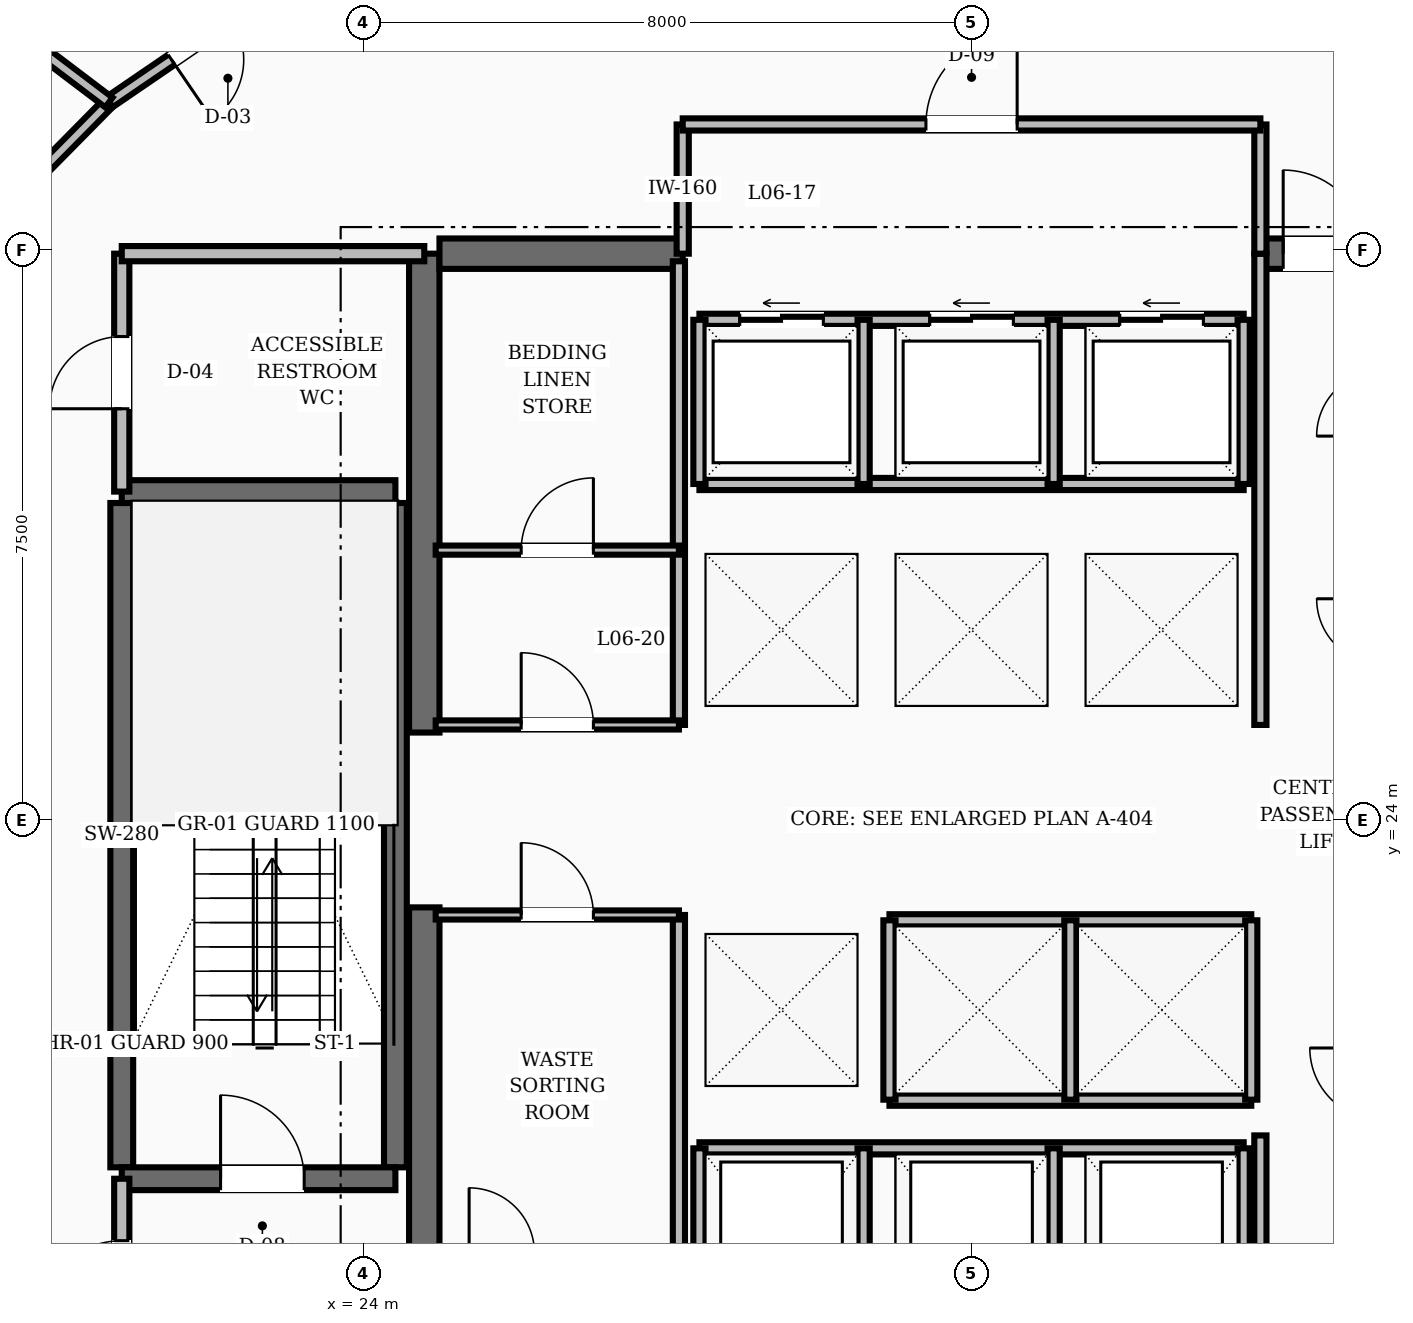
"""IFC4 building model, lengths in metres.
Left out: names, types, materials, properties, quantities, classifications, styles, units other than length and angle.
Written with IfcOpenShell. Run it as: python <this file> out.ifc"""

import sys

from ifc_helpers import new_model, si_unit, direction, frame, frame_2d, origin, place, context, subcontext, project, spatial, rectangle, extrude, element, fill, save


model = new_model("IFC4")
c1 = context("Model", 3, precision=1e-05, world=origin(), true_north=direction((0.0, 1.0)))
c2 = subcontext(c1, "Body", "Model", "MODEL_VIEW")
j1 = project(units=[si_unit("LENGTHUNIT", "METRE"), si_unit("PLANEANGLEUNIT", "RADIAN")], contexts=[c1])
p1 = place(None, origin())
s1 = spatial("IfcSite", under=j1, at=p1, CompositionType="ELEMENT")
p2 = place(p1, origin())
s2 = spatial("IfcBuilding", under=s1, at=p2, CompositionType="ELEMENT")
p3 = place(p2, frame((0.0, 0.0, 30.4)))
s3 = spatial("IfcBuildingStorey", under=s2, at=p3, CompositionType="ELEMENT", Elevation=30.4)
for number, where, z_axis, x_axis in (
    (1, (24.8, 16.55, 0.0), (0.0, 0.0, 1.0), (0.0, 1.0, 0.0)),
    (2, (24.8, 25.15, 0.0), (0.0, 0.0, 1.0), (0.0, 1.0, 0.0)),
):
    element("IfcWall", number, at=place(p3, frame(where, z_axis=z_axis, x_axis=x_axis)), inside=s3, PredefinedType="SHEAR", context=c2, shape_type="SweptSolid", body=[
        extrude(rectangle(XDim=6.3, YDim=0.4, at=frame_2d((3.15, 0.0))), origin(), (0.0, 0.0, 1.0), 3.6),
    ])
p4 = place(p3, frame((25.0, 31.45, 0.0), z_axis=(0.0, 0.0, 1.0), x_axis=(1.0, 0.0, 0.0)))
e3 = element("IfcWall", 3, at=p4, inside=s3, PredefinedType="SHEAR", context=c2, shape_type="SweptSolid", body=[
    extrude(rectangle(XDim=3.2, YDim=0.4, at=frame_2d((1.6, 0.0))), origin(), (0.0, 0.0, 1.0), 3.6),
])
p5 = place(p3, frame((35.8, 31.45, 0.0), z_axis=(0.0, 0.0, 1.0), x_axis=(1.0, 0.0, 0.0)))
e4 = element("IfcWall", 4, at=p5, inside=s3, PredefinedType="SHEAR", context=c2, shape_type="SweptSolid", body=[
    extrude(rectangle(XDim=3.2, YDim=0.4, at=frame_2d((1.6, 0.0))), origin(), (0.0, 0.0, 1.0), 3.6),
])
p6 = place(p5, frame((0.3, 0.0, 0.0)))
e5 = element("IfcOpeningElement", 5, at=p6, cuts=e4, PredefinedType="OPENING", context=c2, shape_type="SweptSolid", body=[
    extrude(rectangle(XDim=1.1, YDim=2.1, at=frame_2d((0.55, 1.05))), frame((0.0, 0.21, 0.0), z_axis=(0.0, -1.0, 0.0), x_axis=(1.0, 0.0, 0.0)), (0.0, 0.0, 1.0), 0.42),
])
for number, where, z_axis, x_axis in (
    (6, (20.82, 19.43, 0.0), (0.0, 0.0, 1.0), (0.0, 1.0, 0.0)),
    (7, (24.42, 19.43, 0.0), (0.0, 0.0, 1.0), (0.0, 1.0, 0.0)),
):
    element("IfcWall", number, at=place(p3, frame(where, z_axis=z_axis, x_axis=x_axis)), inside=s3, PredefinedType="SHEAR", context=c2, shape_type="SweptSolid", body=[
        extrude(rectangle(XDim=8.74, YDim=0.3, at=frame_2d((4.37, 0.0))), origin(), (0.0, 0.0, 1.0), 3.6),
    ])
p7 = place(p3, frame((20.82, 19.28, 0.0), z_axis=(0.0, 0.0, 1.0), x_axis=(1.0, 0.0, 0.0)))
e8 = element("IfcWall", 8, at=p7, inside=s3, PredefinedType="SHEAR", context=c2, shape_type="SweptSolid", body=[
    extrude(rectangle(XDim=3.6, YDim=0.3, at=frame_2d((1.8, 0.0))), origin(), (0.0, 0.0, 1.0), 3.6),
])
p8 = place(p7, frame((1.3, 0.0, 0.0)))
e9 = element("IfcOpeningElement", 9, at=p8, cuts=e8, PredefinedType="OPENING", context=c2, shape_type="SweptSolid", body=[
    extrude(rectangle(XDim=1.1, YDim=2.1, at=frame_2d((0.55, 1.05))), frame((0.0, 0.16, 0.0), z_axis=(0.0, -1.0, 0.0), x_axis=(1.0, 0.0, 0.0)), (0.0, 0.0, 1.0), 0.32),
])
p9 = place(p3, frame((20.82, 28.32, 0.0), z_axis=(0.0, 0.0, 1.0), x_axis=(1.0, 0.0, 0.0)))
e10 = element("IfcWall", 10, at=p9, inside=s3, PredefinedType="SHEAR", context=c2, shape_type="SweptSolid", body=[
    extrude(rectangle(XDim=3.6, YDim=0.3, at=frame_2d((1.8, 0.0))), origin(), (0.0, 0.0, 1.0), 3.6),
])
p10 = place(p3, frame((20.82, 16.55, 0.0), z_axis=(0.0, 0.0, 1.0), x_axis=(0.0, 1.0, 0.0)))
e11 = element("IfcWall", 11, at=p10, inside=s3, PredefinedType="SOLIDWALL", context=c2, shape_type="SweptSolid", body=[
    extrude(rectangle(XDim=2.73, YDim=0.2, at=frame_2d((1.365, 0.0))), origin(), (0.0, 0.0, 1.0), 2.61),
])
p11 = place(p10, frame((0.815, 0.0, 0.0)))
e12 = element("IfcOpeningElement", 12, at=p11, cuts=e11, PredefinedType="OPENING", context=c2, shape_type="SweptSolid", body=[
    extrude(rectangle(XDim=1.1, YDim=2.1, at=frame_2d((0.55, 1.05))), frame((0.0, 0.11, 0.0), z_axis=(0.0, -1.0, 0.0), x_axis=(1.0, 0.0, 0.0)), (0.0, 0.0, 1.0), 0.22),
])
p12 = place(p3, frame((20.82, 28.32, 0.0), z_axis=(0.0, 0.0, 1.0), x_axis=(0.0, 1.0, 0.0)))
e13 = element("IfcWall", 13, at=p12, inside=s3, PredefinedType="SOLIDWALL", context=c2, shape_type="SweptSolid", body=[
    extrude(rectangle(XDim=3.13, YDim=0.2, at=frame_2d((1.565, 0.0))), origin(), (0.0, 0.0, 1.0), 2.61),
])
p13 = place(p12, frame((1.09, 0.0, 0.0)))
e14 = element("IfcOpeningElement", 14, at=p13, cuts=e13, PredefinedType="OPENING", context=c2, shape_type="SweptSolid", body=[
    extrude(rectangle(XDim=0.95, YDim=2.1, at=frame_2d((0.475, 1.05))), frame((0.0, 0.11, 0.0), z_axis=(0.0, -1.0, 0.0), x_axis=(1.0, 0.0, 0.0)), (0.0, 0.0, 1.0), 0.22),
])
p14 = place(p3, frame((20.82, 31.45, 0.0), z_axis=(0.0, 0.0, 1.0), x_axis=(1.0, 0.0, 0.0)))
e15 = element("IfcWall", 15, at=p14, inside=s3, PredefinedType="SOLIDWALL", context=c2, shape_type="SweptSolid", body=[
    extrude(rectangle(XDim=3.98, YDim=0.2, at=frame_2d((1.99, 0.0))), origin(), (0.0, 0.0, 1.0), 2.61),
])
p15 = place(p3, frame((35.8, 16.55, 0.0), z_axis=(0.0, 0.0, 1.0), x_axis=(0.0, 1.0, 0.0)))
e16 = element("IfcWall", 16, at=p15, inside=s3, PredefinedType="SOLIDWALL", context=c2, shape_type="SweptSolid", body=[
    extrude(rectangle(XDim=3.3, YDim=0.16, at=frame_2d((1.65, 0.0))), origin(), (0.0, 0.0, 1.0), 2.61),
])
p16 = place(p3, frame((35.8, 25.25, 0.0), z_axis=(0.0, 0.0, 1.0), x_axis=(0.0, 1.0, 0.0)))
e17 = element("IfcWall", 17, at=p16, inside=s3, PredefinedType="SOLIDWALL", context=c2, shape_type="SweptSolid", body=[
    extrude(rectangle(XDim=6.2, YDim=0.16, at=frame_2d((3.1, 0.0))), origin(), (0.0, 0.0, 1.0), 2.61),
])
p17 = place(p3, frame((28.42, 30.58, 0.0), z_axis=(0.0, 0.0, 1.0), x_axis=(1.0, 0.0, 0.0)))
e18 = element("IfcWall", 18, at=p17, inside=s3, PredefinedType="SOLIDWALL", context=c2, shape_type="SweptSolid", body=[
    extrude(rectangle(XDim=7.16, YDim=0.16, at=frame_2d((3.58, 0.0))), origin(), (0.0, 0.0, 1.0), 2.61),
])
p18 = place(p17, frame((0.53, 0.0, 0.0)))
e19 = element("IfcOpeningElement", 19, at=p18, cuts=e18, PredefinedType="OPENING", context=c2, shape_type="SweptSolid", body=[
    extrude(rectangle(XDim=1.1, YDim=2.15, at=frame_2d((0.55, 1.075))), frame((0.0, 0.09, 0.0), z_axis=(0.0, -1.0, 0.0), x_axis=(1.0, 0.0, 0.0)), (0.0, 0.0, 1.0), 0.18),
])
p19 = place(p17, frame((3.03, 0.0, 0.0)))
e20 = element("IfcOpeningElement", 20, at=p19, cuts=e18, PredefinedType="OPENING", context=c2, shape_type="SweptSolid", body=[
    extrude(rectangle(XDim=1.1, YDim=2.15, at=frame_2d((0.55, 1.075))), frame((0.0, 0.09, 0.0), z_axis=(0.0, -1.0, 0.0), x_axis=(1.0, 0.0, 0.0)), (0.0, 0.0, 1.0), 0.18),
])
p20 = place(p17, frame((5.53, 0.0, 0.0)))
e21 = element("IfcOpeningElement", 21, at=p20, cuts=e18, PredefinedType="OPENING", context=c2, shape_type="SweptSolid", body=[
    extrude(rectangle(XDim=1.1, YDim=2.15, at=frame_2d((0.55, 1.075))), frame((0.0, 0.09, 0.0), z_axis=(0.0, -1.0, 0.0), x_axis=(1.0, 0.0, 0.0)), (0.0, 0.0, 1.0), 0.18),
])
p21 = place(p3, frame((28.42, 28.42, 0.0), z_axis=(0.0, 0.0, 1.0), x_axis=(1.0, 0.0, 0.0)))
e22 = element("IfcWall", 22, at=p21, inside=s3, PredefinedType="SOLIDWALL", context=c2, shape_type="SweptSolid", body=[
    extrude(rectangle(XDim=7.16, YDim=0.16, at=frame_2d((3.58, 0.0))), origin(), (0.0, 0.0, 1.0), 2.61),
])
for number, where, z_axis, x_axis in (
    (23, (28.42, 28.42, 0.0), (0.0, 0.0, 1.0), (0.0, 1.0, 0.0)),
    (24, (30.58, 28.42, 0.0), (0.0, 0.0, 1.0), (0.0, 1.0, 0.0)),
    (25, (33.08, 28.42, 0.0), (0.0, 0.0, 1.0), (0.0, 1.0, 0.0)),
    (26, (35.58, 28.42, 0.0), (0.0, 0.0, 1.0), (0.0, 1.0, 0.0)),
):
    element("IfcWall", number, at=place(p3, frame(where, z_axis=z_axis, x_axis=x_axis)), inside=s3, PredefinedType="SOLIDWALL", context=c2, shape_type="SweptSolid", body=[
        extrude(rectangle(XDim=2.16, YDim=0.16, at=frame_2d((1.08, 0.0))), origin(), (0.0, 0.0, 1.0), 2.61),
    ])
for number, where, z_axis, x_axis in (
    (27, (30.92, 22.68, 0.0), (0.0, 0.0, 1.0), (1.0, 0.0, 0.0)),
    (28, (30.92, 20.32, 0.0), (0.0, 0.0, 1.0), (1.0, 0.0, 0.0)),
):
    element("IfcWall", number, at=place(p3, frame(where, z_axis=z_axis, x_axis=x_axis)), inside=s3, PredefinedType="SOLIDWALL", context=c2, shape_type="SweptSolid", body=[
        extrude(rectangle(XDim=4.76, YDim=0.16, at=frame_2d((2.38, 0.0))), origin(), (0.0, 0.0, 1.0), 2.61),
    ])
for number, where, z_axis, x_axis in (
    (29, (30.92, 20.32, 0.0), (0.0, 0.0, 1.0), (0.0, 1.0, 0.0)),
    (30, (33.3, 20.32, 0.0), (0.0, 0.0, 1.0), (0.0, 1.0, 0.0)),
    (31, (35.68, 20.32, 0.0), (0.0, 0.0, 1.0), (0.0, 1.0, 0.0)),
):
    element("IfcWall", number, at=place(p3, frame(where, z_axis=z_axis, x_axis=x_axis)), inside=s3, PredefinedType="SOLIDWALL", context=c2, shape_type="SweptSolid", body=[
        extrude(rectangle(XDim=2.36, YDim=0.16, at=frame_2d((1.18, 0.0))), origin(), (0.0, 0.0, 1.0), 2.61),
    ])
p22 = place(p3, frame((28.42, 19.68, 0.0), z_axis=(0.0, 0.0, 1.0), x_axis=(1.0, 0.0, 0.0)))
e32 = element("IfcWall", 32, at=p22, inside=s3, PredefinedType="SOLIDWALL", context=c2, shape_type="SweptSolid", body=[
    extrude(rectangle(XDim=7.16, YDim=0.16, at=frame_2d((3.58, 0.0))), origin(), (0.0, 0.0, 1.0), 2.61),
])
for number, where, z_axis, x_axis in (
    (33, (28.42, 16.92, 0.0), (0.0, 0.0, 1.0), (0.0, 1.0, 0.0)),
    (34, (30.58, 16.92, 0.0), (0.0, 0.0, 1.0), (0.0, 1.0, 0.0)),
    (35, (33.08, 16.92, 0.0), (0.0, 0.0, 1.0), (0.0, 1.0, 0.0)),
    (36, (35.58, 16.92, 0.0), (0.0, 0.0, 1.0), (0.0, 1.0, 0.0)),
):
    element("IfcWall", number, at=place(p3, frame(where, z_axis=z_axis, x_axis=x_axis)), inside=s3, PredefinedType="SOLIDWALL", context=c2, shape_type="SweptSolid", body=[
        extrude(rectangle(XDim=2.76, YDim=0.16, at=frame_2d((1.38, 0.0))), origin(), (0.0, 0.0, 1.0), 2.61),
    ])
for number, where, z_axis, x_axis in (
    (37, (28.2, 31.45, 0.0), (0.0, 0.0, 1.0), (0.0, 1.0, 0.0)),
    (38, (35.8, 31.45, 0.0), (0.0, 0.0, 1.0), (0.0, 1.0, 0.0)),
):
    element("IfcWall", number, at=place(p3, frame(where, z_axis=z_axis, x_axis=x_axis)), inside=s3, PredefinedType="SOLIDWALL", context=c2, shape_type="SweptSolid", body=[
        extrude(rectangle(XDim=1.7, YDim=0.16, at=frame_2d((0.85, 0.0))), origin(), (0.0, 0.0, 1.0), 2.61),
    ])
p23 = place(p3, frame((28.2, 33.15, 0.0), z_axis=(0.0, 0.0, 1.0), x_axis=(1.0, 0.0, 0.0)))
e39 = element("IfcWall", 39, at=p23, inside=s3, PredefinedType="SOLIDWALL", context=c2, shape_type="SweptSolid", body=[
    extrude(rectangle(XDim=7.6, YDim=0.16, at=frame_2d((3.8, 0.0))), origin(), (0.0, 0.0, 1.0), 2.61),
])
p24 = place(p23, frame((3.2, 0.0, 0.0)))
e40 = element("IfcOpeningElement", 40, at=p24, cuts=e39, PredefinedType="OPENING", context=c2, shape_type="SweptSolid", body=[
    extrude(rectangle(XDim=1.2, YDim=2.1, at=frame_2d((0.6, 1.05))), frame((0.0, 0.09, 0.0), z_axis=(0.0, -1.0, 0.0), x_axis=(1.0, 0.0, 0.0)), (0.0, 0.0, 1.0), 0.18),
])
p25 = place(p3, frame((28.15, 16.7, 0.0), z_axis=(0.0, 0.0, 1.0), x_axis=(0.0, 1.0, 0.0)))
e41 = element("IfcWall", 41, at=p25, inside=s3, PredefinedType="SOLIDWALL", context=c2, shape_type="SweptSolid", body=[
    extrude(rectangle(XDim=6.05, YDim=0.16, at=frame_2d((3.025, 0.0))), origin(), (0.0, 0.0, 1.0), 2.61),
])
p26 = place(p3, frame((28.15, 25.25, 0.0), z_axis=(0.0, 0.0, 1.0), x_axis=(0.0, 1.0, 0.0)))
e42 = element("IfcWall", 42, at=p26, inside=s3, PredefinedType="SOLIDWALL", context=c2, shape_type="SweptSolid", body=[
    extrude(rectangle(XDim=6.1, YDim=0.16, at=frame_2d((3.05, 0.0))), origin(), (0.0, 0.0, 1.0), 2.61),
])
p27 = place(p3, frame((24.95, 25.25, 0.0), z_axis=(0.0, 0.0, 1.0), x_axis=(1.0, 0.0, 0.0)))
e43 = element("IfcWall", 43, at=p27, inside=s3, PredefinedType="PARTITIONING", context=c2, shape_type="SweptSolid", body=[
    extrude(rectangle(XDim=3.2, YDim=0.12, at=frame_2d((1.6, 0.0))), origin(), (0.0, 0.0, 1.0), 2.61),
])
p28 = place(p27, frame((1.125, 0.0, 0.0)))
e44 = element("IfcOpeningElement", 44, at=p28, cuts=e43, PredefinedType="OPENING", context=c2, shape_type="SweptSolid", body=[
    extrude(rectangle(XDim=0.95, YDim=2.1, at=frame_2d((0.475, 1.05))), frame((0.0, 0.07, 0.0), z_axis=(0.0, -1.0, 0.0), x_axis=(1.0, 0.0, 0.0)), (0.0, 0.0, 1.0), 0.14),
])
p29 = place(p3, frame((24.95, 22.75, 0.0), z_axis=(0.0, 0.0, 1.0), x_axis=(1.0, 0.0, 0.0)))
e45 = element("IfcWall", 45, at=p29, inside=s3, PredefinedType="PARTITIONING", context=c2, shape_type="SweptSolid", body=[
    extrude(rectangle(XDim=3.2, YDim=0.12, at=frame_2d((1.6, 0.0))), origin(), (0.0, 0.0, 1.0), 2.61),
])
p30 = place(p29, frame((1.125, 0.0, 0.0)))
e46 = element("IfcOpeningElement", 46, at=p30, cuts=e45, PredefinedType="OPENING", context=c2, shape_type="SweptSolid", body=[
    extrude(rectangle(XDim=0.95, YDim=2.1, at=frame_2d((0.475, 1.05))), frame((0.0, 0.07, 0.0), z_axis=(0.0, -1.0, 0.0), x_axis=(1.0, 0.0, 0.0)), (0.0, 0.0, 1.0), 0.14),
])
p31 = place(p3, frame((24.95, 27.55, 0.0), z_axis=(0.0, 0.0, 1.0), x_axis=(1.0, 0.0, 0.0)))
e47 = element("IfcWall", 47, at=p31, inside=s3, PredefinedType="PARTITIONING", context=c2, shape_type="SweptSolid", body=[
    extrude(rectangle(XDim=3.2, YDim=0.12, at=frame_2d((1.6, 0.0))), origin(), (0.0, 0.0, 1.0), 2.61),
])
p32 = place(p31, frame((1.125, 0.0, 0.0)))
e48 = element("IfcOpeningElement", 48, at=p32, cuts=e47, PredefinedType="OPENING", context=c2, shape_type="SweptSolid", body=[
    extrude(rectangle(XDim=0.95, YDim=2.1, at=frame_2d((0.475, 1.05))), frame((0.0, 0.07, 0.0), z_axis=(0.0, -1.0, 0.0), x_axis=(1.0, 0.0, 0.0)), (0.0, 0.0, 1.0), 0.14),
])
p33 = place(p3, frame((23.083, 35.1, 0.0), z_axis=(0.0, 0.0, 1.0), x_axis=(-0.825929039072, -0.563774088104, 0.0)))
e49 = element("IfcWall", 49, at=p33, inside=s3, PredefinedType="SOLIDWALL", context=c2, shape_type="SweptSolid", body=[
    extrude(rectangle(XDim=2.945, YDim=0.16, at=frame_2d((1.472, 0.0))), origin(), (0.0, 0.0, 1.0), 2.61),
])
p34 = place(p33, frame((0.997, 0.0, 0.0)))
e50 = element("IfcOpeningElement", 50, at=p34, cuts=e49, PredefinedType="OPENING", context=c2, shape_type="SweptSolid", body=[
    extrude(rectangle(XDim=0.95, YDim=2.1, at=frame_2d((0.475, 1.05))), frame((0.0, 0.09, 0.0), z_axis=(0.0, -1.0, 0.0), x_axis=(1.0, 0.0, 0.0)), (0.0, 0.0, 1.0), 0.18),
])
p35 = place(p3, frame((20.651, 33.44, 0.0), z_axis=(0.0, 0.0, 1.0), x_axis=(-0.702366174226, -0.711815816981, 0.0)))
e51 = element("IfcWall", 51, at=p35, inside=s3, PredefinedType="SOLIDWALL", context=c2, shape_type="SweptSolid", body=[
    extrude(rectangle(XDim=2.842, YDim=0.16, at=frame_2d((1.421, 0.0))), origin(), (0.0, 0.0, 1.0), 2.61),
])
p36 = place(p3, frame((20.651, 33.44, 0.0), z_axis=(0.0, 0.0, 1.0), x_axis=(-0.797056829768, 0.603904305433, 0.0)))
e52 = element("IfcWall", 52, at=p36, inside=s3, PredefinedType="SOLIDWALL", context=c2, shape_type="SweptSolid", body=[
    extrude(rectangle(XDim=8.369, YDim=0.16, at=frame_2d((4.185, 0.0))), origin(), (0.0, 0.0, 1.0), 2.61),
])
p37 = place(p8, origin())
e53 = element("IfcDoor", 53, at=p37, inside=s3, OperationType="SINGLE_SWING_LEFT", PredefinedType="DOOR", context=c2, shape_type="SweptSolid", body=[
    extrude(rectangle(XDim=1.1, YDim=2.1, at=frame_2d((0.55, 1.05))), frame((0.0, 0.025, 0.0), z_axis=(0.0, -1.0, 0.0), x_axis=(1.0, 0.0, 0.0)), (0.0, 0.0, 1.0), 0.05),
])
fill(e9, e53)
p38 = place(p11, origin())
e54 = element("IfcDoor", 54, at=p38, inside=s3, OperationType="SINGLE_SWING_LEFT", PredefinedType="DOOR", context=c2, shape_type="SweptSolid", body=[
    extrude(rectangle(XDim=1.1, YDim=2.1, at=frame_2d((0.55, 1.05))), frame((0.0, 0.025, 0.0), z_axis=(0.0, -1.0, 0.0), x_axis=(1.0, 0.0, 0.0)), (0.0, 0.0, 1.0), 0.05),
])
fill(e12, e54)
p39 = place(p13, origin())
e55 = element("IfcDoor", 55, at=p39, inside=s3, OperationType="SINGLE_SWING_LEFT", PredefinedType="DOOR", context=c2, shape_type="SweptSolid", body=[
    extrude(rectangle(XDim=0.95, YDim=2.1, at=frame_2d((0.475, 1.05))), frame((0.0, 0.025, 0.0), z_axis=(0.0, -1.0, 0.0), x_axis=(1.0, 0.0, 0.0)), (0.0, 0.0, 1.0), 0.05),
])
fill(e14, e55)
p40 = place(p6, origin())
e56 = element("IfcDoor", 56, at=p40, inside=s3, OperationType="SINGLE_SWING_LEFT", PredefinedType="DOOR", context=c2, shape_type="SweptSolid", body=[
    extrude(rectangle(XDim=1.1, YDim=2.1, at=frame_2d((0.55, 1.05))), frame((0.0, 0.025, 0.0), z_axis=(0.0, -1.0, 0.0), x_axis=(1.0, 0.0, 0.0)), (0.0, 0.0, 1.0), 0.05),
])
fill(e5, e56)
p41 = place(p18, origin())
e57 = element("IfcDoor", 57, at=p41, inside=s3, OperationType="SLIDING_TO_LEFT", PredefinedType="DOOR", context=c2, shape_type="SweptSolid", body=[
    extrude(rectangle(XDim=1.1, YDim=2.15, at=frame_2d((0.55, 1.075))), frame((0.0, 0.025, 0.0), z_axis=(0.0, -1.0, 0.0), x_axis=(1.0, 0.0, 0.0)), (0.0, 0.0, 1.0), 0.05),
])
fill(e19, e57)
p42 = place(p19, origin())
e58 = element("IfcDoor", 58, at=p42, inside=s3, OperationType="SLIDING_TO_LEFT", PredefinedType="DOOR", context=c2, shape_type="SweptSolid", body=[
    extrude(rectangle(XDim=1.1, YDim=2.15, at=frame_2d((0.55, 1.075))), frame((0.0, 0.025, 0.0), z_axis=(0.0, -1.0, 0.0), x_axis=(1.0, 0.0, 0.0)), (0.0, 0.0, 1.0), 0.05),
])
fill(e20, e58)
p43 = place(p20, origin())
e59 = element("IfcDoor", 59, at=p43, inside=s3, OperationType="SLIDING_TO_LEFT", PredefinedType="DOOR", context=c2, shape_type="SweptSolid", body=[
    extrude(rectangle(XDim=1.1, YDim=2.15, at=frame_2d((0.55, 1.075))), frame((0.0, 0.025, 0.0), z_axis=(0.0, -1.0, 0.0), x_axis=(1.0, 0.0, 0.0)), (0.0, 0.0, 1.0), 0.05),
])
fill(e21, e59)
p44 = place(p24, origin())
e60 = element("IfcDoor", 60, at=p44, inside=s3, OperationType="SINGLE_SWING_RIGHT", PredefinedType="DOOR", context=c2, shape_type="SweptSolid", body=[
    extrude(rectangle(XDim=1.2, YDim=2.1, at=frame_2d((0.6, 1.05))), frame((0.0, 0.025, 0.0), z_axis=(0.0, -1.0, 0.0), x_axis=(1.0, 0.0, 0.0)), (0.0, 0.0, 1.0), 0.05),
])
fill(e40, e60)
p45 = place(p28, origin())
e61 = element("IfcDoor", 61, at=p45, inside=s3, OperationType="SINGLE_SWING_LEFT", PredefinedType="DOOR", context=c2, shape_type="SweptSolid", body=[
    extrude(rectangle(XDim=0.95, YDim=2.1, at=frame_2d((0.475, 1.05))), frame((0.0, 0.025, 0.0), z_axis=(0.0, -1.0, 0.0), x_axis=(1.0, 0.0, 0.0)), (0.0, 0.0, 1.0), 0.05),
])
fill(e44, e61)
p46 = place(p32, origin())
e62 = element("IfcDoor", 62, at=p46, inside=s3, OperationType="SINGLE_SWING_RIGHT", PredefinedType="DOOR", context=c2, shape_type="SweptSolid", body=[
    extrude(rectangle(XDim=0.95, YDim=2.1, at=frame_2d((0.475, 1.05))), frame((0.0, 0.025, 0.0), z_axis=(0.0, -1.0, 0.0), x_axis=(1.0, 0.0, 0.0)), (0.0, 0.0, 1.0), 0.05),
])
fill(e48, e62)
p47 = place(p30, origin())
e63 = element("IfcDoor", 63, at=p47, inside=s3, OperationType="SINGLE_SWING_LEFT", PredefinedType="DOOR", context=c2, shape_type="SweptSolid", body=[
    extrude(rectangle(XDim=0.95, YDim=2.1, at=frame_2d((0.475, 1.05))), frame((0.0, 0.025, 0.0), z_axis=(0.0, -1.0, 0.0), x_axis=(1.0, 0.0, 0.0)), (0.0, 0.0, 1.0), 0.05),
])
fill(e46, e63)
p48 = place(p34, origin())
e64 = element("IfcDoor", 64, at=p48, inside=s3, OperationType="SINGLE_SWING_RIGHT", PredefinedType="DOOR", context=c2, shape_type="SweptSolid", body=[
    extrude(rectangle(XDim=0.95, YDim=2.1, at=frame_2d((0.475, 1.05))), frame((0.0, 0.025, 0.0), z_axis=(0.0, -1.0, 0.0), x_axis=(1.0, 0.0, 0.0)), (0.0, 0.0, 1.0), 0.05),
])
fill(e50, e64)
save(model, sys.argv[1])
